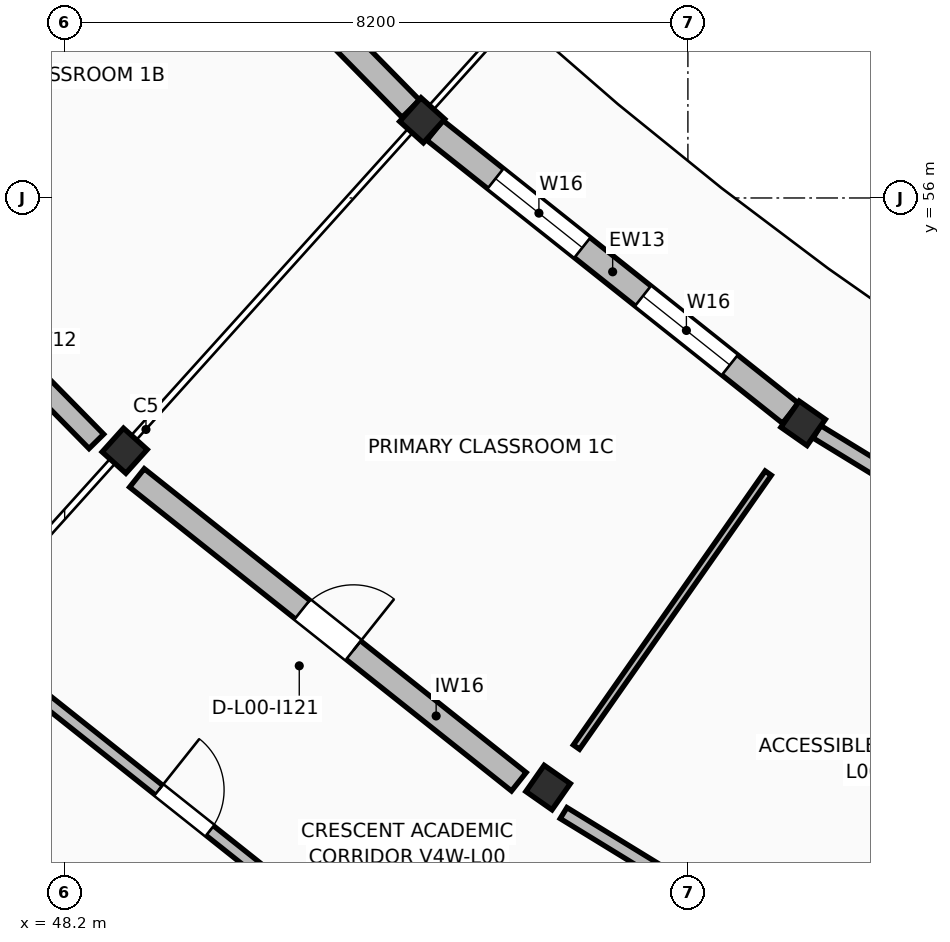
"""IFC4 building model, lengths in metres.
Left out: names, types, materials, properties, quantities, classifications, styles, units other than length and angle.
Written with IfcOpenShell. Run it as: python <this file> out.ifc"""

import sys

from ifc_helpers import new_model, si_unit, direction, frame, frame_2d, origin, origin_2d, place, context, subcontext, project, spatial, rectangle, extrude, element, fill, save


model = new_model("IFC4")
c1 = context("Model", 3, precision=1e-05, world=origin(), true_north=direction((0.0, 1.0)))
c2 = subcontext(c1, "Body", "Model", "MODEL_VIEW")
j1 = project(units=[si_unit("LENGTHUNIT", "METRE"), si_unit("PLANEANGLEUNIT", "RADIAN")], contexts=[c1])
p1 = place(None, origin())
s1 = spatial("IfcSite", under=j1, at=p1, CompositionType="ELEMENT")
p2 = place(p1, origin())
s2 = spatial("IfcBuilding", under=s1, at=p2, CompositionType="ELEMENT")
p3 = place(p2, origin())
s3 = spatial("IfcBuildingStorey", under=s2, at=p3, CompositionType="ELEMENT", Elevation=0.0)
for number, where, z_axis, x_axis in (
    (1, (52.904, 57.022, 0.0), (0.0, 0.0, 1.0), (-0.669, -0.743, 0.0)),
    (2, (48.99, 52.675, 0.0), (0.0, 0.0, 1.0), (-0.669, -0.743, 0.0)),
    (3, (57.916, 53.035, 0.0), (0.0, 0.0, 1.0), (-0.574, -0.819, 0.0)),
    (4, (54.561, 48.243, 0.0), (0.0, 0.0, 1.0), (-0.574, -0.819, 0.0)),
):
    element("IfcColumn", number, at=place(p3, frame(where, z_axis=z_axis, x_axis=x_axis)), inside=s3, PredefinedType="COLUMN", context=c2, shape_type="SweptSolid", body=[
        extrude(rectangle(XDim=0.42, YDim=0.42, at=origin_2d()), origin(), (0.0, 0.0, 1.0), 4.42),
    ])
p4 = place(p3, frame((48.565, 61.438, 0.0), z_axis=(0.0, 0.0, 1.0), x_axis=(0.700933675957, -0.713226459064, 0.0)))
e5 = element("IfcWall", 5, at=p4, inside=s3, PredefinedType="STANDARD", context=c2, shape_type="SweptSolid", body=[
    extrude(rectangle(XDim=5.978, YDim=0.324, at=frame_2d((2.989, 0.0))), origin(), (0.0, 0.0, 1.0), 3.4),
])
p5 = place(p4, frame((2.064, 0.0, 0.0)))
e6 = element("IfcOpeningElement", 6, at=p5, cuts=e5, PredefinedType="OPENING", context=c2, shape_type="SweptSolid", body=[
    extrude(rectangle(XDim=1.85, YDim=2.28, at=frame_2d((0.925, 1.14))), frame((0.0, 0.172, 0.0), z_axis=(0.0, -1.0, 0.0), x_axis=(1.0, 0.0, 0.0)), (0.0, 0.0, 1.0), 0.344),
])
p6 = place(p3, frame((53.071, 56.889, 0.0), z_axis=(0.0, 0.0, 1.0), x_axis=(0.782606932648, -0.62251617567, 0.0)))
e7 = element("IfcWall", 7, at=p6, inside=s3, PredefinedType="STANDARD", context=c2, shape_type="SweptSolid", body=[
    extrude(rectangle(XDim=5.978, YDim=0.336, at=frame_2d((2.989, 0.0))), origin(), (0.0, 0.0, 1.0), 3.4),
])
p7 = place(p6, frame((1.019, 0.0, 0.95)))
e8 = element("IfcOpeningElement", 8, at=p7, cuts=e7, PredefinedType="OPENING", context=c2, shape_type="SweptSolid", body=[
    extrude(rectangle(XDim=1.46, YDim=1.6, at=frame_2d((0.73, 0.8))), frame((0.0, 0.178, 0.0), z_axis=(0.0, -1.0, 0.0), x_axis=(1.0, 0.0, 0.0)), (0.0, 0.0, 1.0), 0.356),
])
p8 = place(p6, frame((3.499, 0.0, 0.95)))
e9 = element("IfcOpeningElement", 9, at=p8, cuts=e7, PredefinedType="OPENING", context=c2, shape_type="SweptSolid", body=[
    extrude(rectangle(XDim=1.46, YDim=1.6, at=frame_2d((0.73, 0.8))), frame((0.0, 0.178, 0.0), z_axis=(0.0, -1.0, 0.0), x_axis=(1.0, 0.0, 0.0)), (0.0, 0.0, 1.0), 0.356),
])
p9 = place(p3, frame((58.097, 52.924, 0.0), z_axis=(0.0, 0.0, 1.0), x_axis=(0.852659356221, -0.522467245145, 0.0)))
e10 = element("IfcWall", 10, at=p9, inside=s3, PredefinedType="STANDARD", context=c2, shape_type="SweptSolid", body=[
    extrude(rectangle(XDim=5.978, YDim=0.192, at=frame_2d((2.989, 0.0))), origin(), (0.0, 0.0, 1.0), 3.4),
])
p10 = place(p9, frame((2.314, 0.0, 0.0)))
e11 = element("IfcOpeningElement", 11, at=p10, cuts=e10, PredefinedType="OPENING", context=c2, shape_type="SweptSolid", body=[
    extrude(rectangle(XDim=1.35, YDim=2.2, at=frame_2d((0.675, 1.1))), frame((0.0, 0.106, 0.0), z_axis=(0.0, -1.0, 0.0), x_axis=(1.0, 0.0, 0.0)), (0.0, 0.0, 1.0), 0.212),
])
p11 = place(p3, frame((44.117, 57.377, 0.0), z_axis=(0.0, 0.0, 1.0), x_axis=(0.700900509406, -0.713259052459, 0.0)))
e12 = element("IfcWall", 12, at=p11, inside=s3, PredefinedType="STANDARD", context=c2, shape_type="SweptSolid", body=[
    extrude(rectangle(XDim=6.42, YDim=0.27, at=frame_2d((3.21, 0.0))), origin(), (0.0, 0.0, 1.0), 3.38),
])
p12 = place(p11, frame((2.7, 0.0, 0.0)))
e13 = element("IfcOpeningElement", 13, at=p12, cuts=e12, PredefinedType="OPENING", context=c2, shape_type="SweptSolid", body=[
    extrude(rectangle(XDim=1.02, YDim=2.24, at=frame_2d((0.51, 1.12))), frame((0.0, 0.145, 0.0), z_axis=(0.0, -1.0, 0.0), x_axis=(1.0, 0.0, 0.0)), (0.0, 0.0, 1.0), 0.29),
])
p13 = place(p3, frame((49.151, 52.317, 0.0), z_axis=(0.0, 0.0, 1.0), x_axis=(0.782605685559, -0.622517743467, 0.0)))
e14 = element("IfcWall", 14, at=p13, inside=s3, PredefinedType="STANDARD", context=c2, shape_type="SweptSolid", body=[
    extrude(rectangle(XDim=6.42, YDim=0.31, at=frame_2d((3.21, 0.0))), origin(), (0.0, 0.0, 1.0), 3.38),
])
p14 = place(p13, frame((2.78, 0.0, 0.0)))
e15 = element("IfcOpeningElement", 15, at=p14, cuts=e14, PredefinedType="OPENING", context=c2, shape_type="SweptSolid", body=[
    extrude(rectangle(XDim=0.86, YDim=2.12, at=frame_2d((0.43, 1.06))), frame((0.0, 0.165, 0.0), z_axis=(0.0, -1.0, 0.0), x_axis=(1.0, 0.0, 0.0)), (0.0, 0.0, 1.0), 0.33),
])
p15 = place(p3, frame((47.117, 50.058, 0.0), z_axis=(0.0, 0.0, 1.0), x_axis=(0.782615780998, -0.622505051653, 0.0)))
e16 = element("IfcWall", 16, at=p15, inside=s3, PredefinedType="STANDARD", context=c2, shape_type="SweptSolid", body=[
    extrude(rectangle(XDim=6.792, YDim=0.16, at=frame_2d((3.396, 0.0))), origin(), (0.0, 0.0, 1.0), 3.38),
])
p16 = place(p15, frame((2.966, 0.0, 0.0)))
e17 = element("IfcOpeningElement", 17, at=p16, cuts=e16, PredefinedType="OPENING", context=c2, shape_type="SweptSolid", body=[
    extrude(rectangle(XDim=0.86, YDim=2.18, at=frame_2d((0.43, 1.09))), frame((0.0, 0.09, 0.0), z_axis=(0.0, -1.0, 0.0), x_axis=(1.0, 0.0, 0.0)), (0.0, 0.0, 1.0), 0.18),
])
p17 = place(p3, frame((54.764, 47.908, 0.0), z_axis=(0.0, 0.0, 1.0), x_axis=(0.852626937867, -0.522520147767, 0.0)))
e18 = element("IfcWall", 18, at=p17, inside=s3, PredefinedType="STANDARD", context=c2, shape_type="SweptSolid", body=[
    extrude(rectangle(XDim=6.42, YDim=0.17, at=frame_2d((3.21, 0.0))), origin(), (0.0, 0.0, 1.0), 3.38),
])
p18 = place(p17, frame((2.78, 0.0, 0.0)))
e19 = element("IfcOpeningElement", 19, at=p18, cuts=e18, PredefinedType="OPENING", context=c2, shape_type="SweptSolid", body=[
    extrude(rectangle(XDim=0.86, YDim=2.24, at=frame_2d((0.43, 1.12))), frame((0.0, 0.095, 0.0), z_axis=(0.0, -1.0, 0.0), x_axis=(1.0, 0.0, 0.0)), (0.0, 0.0, 1.0), 0.19),
])
p19 = place(p3, frame((57.457, 52.38, 0.0), z_axis=(0.0, 0.0, 1.0), x_axis=(-0.573570334442, -0.819156316858, 0.0)))
e20 = element("IfcWall", 20, at=p19, inside=s3, PredefinedType="PARTITIONING", context=c2, shape_type="SweptSolid", body=[
    extrude(rectangle(XDim=4.4, YDim=0.098, at=frame_2d((2.2, 0.0))), origin(), (0.0, 0.0, 1.0), 3.38),
])
p20 = place(p7, origin())
e21 = element("IfcWindow", 21, at=p20, inside=s3, PartitioningType="SINGLE_PANEL", PredefinedType="WINDOW", context=c2, shape_type="SweptSolid", body=[
    extrude(rectangle(XDim=1.46, YDim=1.6, at=frame_2d((0.73, 0.8))), frame((0.0, 0.03, 0.0), z_axis=(0.0, -1.0, 0.0), x_axis=(1.0, 0.0, 0.0)), (0.0, 0.0, 1.0), 0.06),
])
fill(e8, e21)
p21 = place(p8, origin())
e22 = element("IfcWindow", 22, at=p21, inside=s3, PartitioningType="SINGLE_PANEL", PredefinedType="WINDOW", context=c2, shape_type="SweptSolid", body=[
    extrude(rectangle(XDim=1.46, YDim=1.6, at=frame_2d((0.73, 0.8))), frame((0.0, 0.03, 0.0), z_axis=(0.0, -1.0, 0.0), x_axis=(1.0, 0.0, 0.0)), (0.0, 0.0, 1.0), 0.06),
])
fill(e9, e22)
p22 = place(p14, frame((0.86, 0.0, 0.0), z_axis=(0.0, 0.0, 1.0), x_axis=(-1.0, 0.0, 0.0)))
e23 = element("IfcDoor", 23, at=p22, inside=s3, OperationType="SINGLE_SWING_RIGHT", PredefinedType="DOOR", context=c2, shape_type="SweptSolid", body=[
    extrude(rectangle(XDim=0.86, YDim=2.12, at=frame_2d((0.43, 1.06))), frame((0.0, 0.025, 0.0), z_axis=(0.0, -1.0, 0.0), x_axis=(1.0, 0.0, 0.0)), (0.0, 0.0, 1.0), 0.05),
])
fill(e15, e23)
p23 = place(p16, origin())
e24 = element("IfcDoor", 24, at=p23, inside=s3, OperationType="SINGLE_SWING_LEFT", PredefinedType="DOOR", context=c2, shape_type="SweptSolid", body=[
    extrude(rectangle(XDim=0.86, YDim=2.18, at=frame_2d((0.43, 1.09))), frame((0.0, 0.025, 0.0), z_axis=(0.0, -1.0, 0.0), x_axis=(1.0, 0.0, 0.0)), (0.0, 0.0, 1.0), 0.05),
])
fill(e17, e24)
save(model, sys.argv[1])
